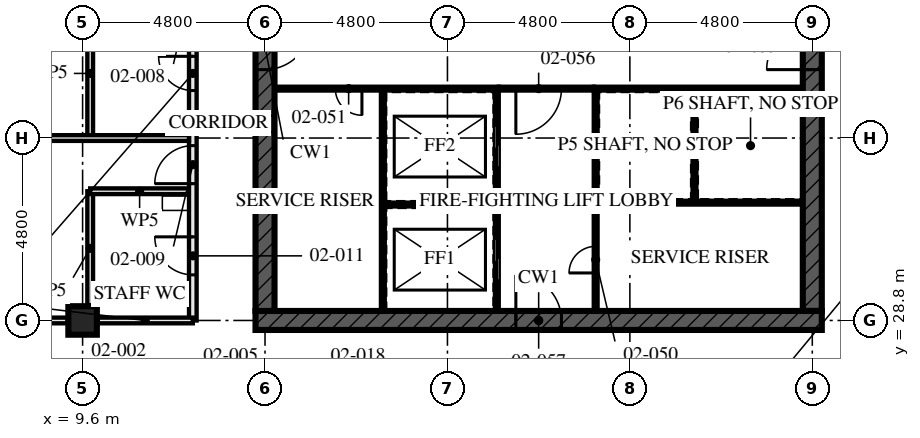
"""IFC4 building model, lengths in metres.
Left out: names, types, materials, properties, quantities, classifications, styles, units other than length and angle.
Written with IfcOpenShell. Run it as: python <this file> out.ifc"""

import sys

from ifc_helpers import new_model, si_unit, direction, frame, frame_2d, origin, origin_2d, place, context, subcontext, project, spatial, rectangle, hollow_rectangle, extrude, element, fill, save


model = new_model("IFC4")
c1 = context("Model", 3, precision=1e-05, world=origin(), true_north=direction((0.0, 1.0)))
c2 = subcontext(c1, "Body", "Model", "MODEL_VIEW")
j1 = project(units=[si_unit("LENGTHUNIT", "METRE"), si_unit("PLANEANGLEUNIT", "RADIAN")], contexts=[c1])
p1 = place(None, origin())
s1 = spatial("IfcSite", under=j1, at=p1, CompositionType="ELEMENT")
p2 = place(p1, origin())
s2 = spatial("IfcBuilding", under=s1, at=p2, CompositionType="ELEMENT")
p3 = place(p2, frame((0.0, 0.0, 9.0)))
s3 = spatial("IfcBuildingStorey", under=s2, at=p3, CompositionType="ELEMENT", Elevation=9.0)
p4 = place(p3, frame((9.6, 28.8, 0.0), z_axis=(0.0, 0.0, 1.0), x_axis=(0.0, 1.0, 0.0)))
e1 = element("IfcColumn", 1, at=p4, inside=s3, PredefinedType="COLUMN", context=c2, shape_type="SweptSolid", body=[
    extrude(hollow_rectangle(XDim=0.75, YDim=0.75, WallThickness=0.08, at=origin_2d()), origin(), (0.0, 0.0, 1.0), 4.5),
])
p5 = place(p3, frame((14.15, 28.8, -0.17), z_axis=(0.0, 0.0, 1.0), x_axis=(1.0, 0.0, 0.0)))
e2 = element("IfcWall", 2, at=p5, inside=s3, PredefinedType="SHEAR", context=c2, shape_type="SweptSolid", body=[
    extrude(rectangle(XDim=14.9, YDim=0.5, at=frame_2d((7.45, 0.0))), origin(), (0.0, 0.0, 1.0), 4.5),
])
p6 = place(p5, frame((6.85, 0.0, 0.17)))
e3 = element("IfcOpeningElement", 3, at=p6, cuts=e2, PredefinedType="OPENING", context=c2, shape_type="SweptSolid", body=[
    extrude(rectangle(XDim=1.2, YDim=2.1, at=frame_2d((0.6, 1.05))), frame((0.0, 0.26, 0.0), z_axis=(0.0, -1.0, 0.0), x_axis=(1.0, 0.0, 0.0)), (0.0, 0.0, 1.0), 0.521),
])
p7 = place(p3, frame((14.4, 42.95, -0.17), z_axis=(0.0, 0.0, 1.0), x_axis=(0.0, -1.0, 0.0)))
e4 = element("IfcWall", 4, at=p7, inside=s3, PredefinedType="SHEAR", context=c2, shape_type="SweptSolid", body=[
    extrude(rectangle(XDim=13.9, YDim=0.5, at=frame_2d((6.95, 0.0))), origin(), (0.0, 0.0, 1.0), 4.5),
])
p8 = place(p7, frame((6.35, 0.0, 0.17)))
e5 = element("IfcOpeningElement", 5, at=p8, cuts=e4, PredefinedType="OPENING", context=c2, shape_type="SweptSolid", body=[
    extrude(rectangle(XDim=1.2, YDim=2.1, at=frame_2d((0.6, 1.05))), frame((0.0, 0.26, 0.0), z_axis=(0.0, -1.0, 0.0), x_axis=(1.0, 0.0, 0.0)), (0.0, 0.0, 1.0), 0.521),
])
p9 = place(p3, frame((28.8, 29.05, -0.17), z_axis=(0.0, 0.0, 1.0), x_axis=(0.0, 1.0, 0.0)))
e6 = element("IfcWall", 6, at=p9, inside=s3, PredefinedType="SHEAR", context=c2, shape_type="SweptSolid", body=[
    extrude(rectangle(XDim=13.9, YDim=0.5, at=frame_2d((6.95, 0.0))), origin(), (0.0, 0.0, 1.0), 4.5),
])
p10 = place(p9, frame((6.35, 0.0, 0.17)))
e7 = element("IfcOpeningElement", 7, at=p10, cuts=e6, PredefinedType="OPENING", context=c2, shape_type="SweptSolid", body=[
    extrude(rectangle(XDim=1.2, YDim=2.1, at=frame_2d((0.6, 1.05))), frame((0.0, 0.26, 0.0), z_axis=(0.0, -1.0, 0.0), x_axis=(1.0, 0.0, 0.0)), (0.0, 0.0, 1.0), 0.521),
])
p11 = place(p3, frame((9.8, 37.0, 0.0), z_axis=(0.0, 0.0, 1.0), x_axis=(0.0, -1.0, 0.0)))
e8 = element("IfcWall", 8, at=p11, inside=s3, PredefinedType="PARTITIONING", context=c2, shape_type="SweptSolid", body=[
    extrude(rectangle(XDim=3.4, YDim=0.15, at=frame_2d((1.7, 0.0))), origin(), (0.0, 0.0, 1.0), 4.33),
])
p12 = place(p3, frame((9.8, 32.2, 0.0), z_axis=(0.0, 0.0, 1.0), x_axis=(1.0, 0.0, 0.0)))
e9 = element("IfcWall", 9, at=p12, inside=s3, PredefinedType="PARTITIONING", context=c2, shape_type="SweptSolid", body=[
    extrude(rectangle(XDim=2.6, YDim=0.15, at=frame_2d((1.3, 0.0))), origin(), (0.0, 0.0, 1.0), 4.33),
])
p13 = place(p3, frame((9.8, 32.2, 0.0), z_axis=(0.0, 0.0, 1.0), x_axis=(0.0, -1.0, 0.0)))
e10 = element("IfcWall", 10, at=p13, inside=s3, PredefinedType="PARTITIONING", context=c2, shape_type="SweptSolid", body=[
    extrude(rectangle(XDim=3.005, YDim=0.15, at=frame_2d((1.502, 0.0))), origin(), (0.0, 0.0, 1.0), 4.33),
])
p14 = place(p3, frame((0.395, 33.6, 0.0), z_axis=(0.0, 0.0, 1.0), x_axis=(1.0, 0.0, 0.0)))
e11 = element("IfcWall", 11, at=p14, inside=s3, PredefinedType="PARTITIONING", context=c2, shape_type="SweptSolid", body=[
    extrude(rectangle(XDim=12.005, YDim=0.15, at=frame_2d((6.002, 0.0))), origin(), (0.0, 0.0, 1.0), 3.55),
])
p15 = place(p3, frame((12.5, 43.2, 0.0), z_axis=(0.0, 0.0, 1.0), x_axis=(0.0, -1.0, 0.0)))
e12 = element("IfcWall", 12, at=p15, inside=s3, PredefinedType="PARTITIONING", context=c2, shape_type="SweptSolid", body=[
    extrude(rectangle(XDim=14.4, YDim=0.2, at=frame_2d((7.2, 0.0))), origin(), (0.0, 0.0, 1.0), 3.55),
])
p16 = place(p15, frame((1.4, 0.0, 0.0)))
e13 = element("IfcOpeningElement", 13, at=p16, cuts=e12, PredefinedType="OPENING", context=c2, shape_type="SweptSolid", body=[
    extrude(rectangle(XDim=1.0, YDim=2.1, at=frame_2d((0.5, 1.05))), frame((0.0, 0.111, 0.0), z_axis=(0.0, -1.0, 0.0), x_axis=(1.0, 0.0, 0.0)), (0.0, 0.0, 1.0), 0.221),
])
p17 = place(p15, frame((3.6, 0.0, 0.0)))
e14 = element("IfcOpeningElement", 14, at=p17, cuts=e12, PredefinedType="OPENING", context=c2, shape_type="SweptSolid", body=[
    extrude(rectangle(XDim=1.0, YDim=2.4, at=frame_2d((0.5, 1.2))), frame((0.0, 0.111, 0.0), z_axis=(0.0, -1.0, 0.0), x_axis=(1.0, 0.0, 0.0)), (0.0, 0.0, 1.0), 0.221),
])
p18 = place(p15, frame((5.0, 0.0, 0.0)))
e15 = element("IfcOpeningElement", 15, at=p18, cuts=e12, PredefinedType="OPENING", context=c2, shape_type="SweptSolid", body=[
    extrude(rectangle(XDim=1.0, YDim=2.4, at=frame_2d((0.5, 1.2))), frame((0.0, 0.111, 0.0), z_axis=(0.0, -1.0, 0.0), x_axis=(1.0, 0.0, 0.0)), (0.0, 0.0, 1.0), 0.221),
])
p19 = place(p15, frame((9.8, 0.0, 0.0)))
e16 = element("IfcOpeningElement", 16, at=p19, cuts=e12, PredefinedType="OPENING", context=c2, shape_type="SweptSolid", body=[
    extrude(rectangle(XDim=1.0, YDim=2.4, at=frame_2d((0.5, 1.2))), frame((0.0, 0.111, 0.0), z_axis=(0.0, -1.0, 0.0), x_axis=(1.0, 0.0, 0.0)), (0.0, 0.0, 1.0), 0.221),
])
p20 = place(p15, frame((7.45, 0.0, 0.0)))
e17 = element("IfcOpeningElement", 17, at=p20, cuts=e12, PredefinedType="OPENING", context=c2, shape_type="SweptSolid", body=[
    extrude(rectangle(XDim=0.9, YDim=2.1, at=frame_2d((0.45, 1.05))), frame((0.0, 0.111, 0.0), z_axis=(0.0, -1.0, 0.0), x_axis=(1.0, 0.0, 0.0)), (0.0, 0.0, 1.0), 0.221),
])
p21 = place(p15, frame((12.2, 0.0, 0.0)))
e18 = element("IfcOpeningElement", 18, at=p21, cuts=e12, PredefinedType="OPENING", context=c2, shape_type="SweptSolid", body=[
    extrude(rectangle(XDim=1.0, YDim=2.1, at=frame_2d((0.5, 1.05))), frame((0.0, 0.111, 0.0), z_axis=(0.0, -1.0, 0.0), x_axis=(1.0, 0.0, 0.0)), (0.0, 0.0, 1.0), 0.221),
])
p22 = place(p3, frame((20.5, 29.05, 0.0), z_axis=(0.0, 0.0, 1.0), x_axis=(0.0, 1.0, 0.0)))
e19 = element("IfcWall", 19, at=p22, inside=s3, PredefinedType="SOLIDWALL", context=c2, shape_type="SweptSolid", body=[
    extrude(rectangle(XDim=5.8, YDim=0.1, at=frame_2d((2.9, 0.0))), origin(), (0.0, 0.0, 1.0), 4.33),
])
p23 = place(p22, frame((0.8, 0.0, 0.0)))
e20 = element("IfcOpeningElement", 20, at=p23, cuts=e19, PredefinedType="OPENING", context=c2, shape_type="SweptSolid", body=[
    extrude(rectangle(XDim=1.1, YDim=2.3, at=frame_2d((0.55, 1.15))), frame((0.0, 0.061, 0.0), z_axis=(0.0, -1.0, 0.0), x_axis=(1.0, 0.0, 0.0)), (0.0, 0.0, 1.0), 0.121),
])
p24 = place(p22, frame((3.775, 0.0, 0.0)))
e21 = element("IfcOpeningElement", 21, at=p24, cuts=e19, PredefinedType="OPENING", context=c2, shape_type="SweptSolid", body=[
    extrude(rectangle(XDim=1.1, YDim=2.3, at=frame_2d((0.55, 1.15))), frame((0.0, 0.061, 0.0), z_axis=(0.0, -1.0, 0.0), x_axis=(1.0, 0.0, 0.0)), (0.0, 0.0, 1.0), 0.121),
])
p25 = place(p3, frame((23.1, 29.05, 0.0), z_axis=(0.0, 0.0, 1.0), x_axis=(0.0, 1.0, 0.0)))
e22 = element("IfcWall", 22, at=p25, inside=s3, PredefinedType="SOLIDWALL", context=c2, shape_type="SweptSolid", body=[
    extrude(rectangle(XDim=5.8, YDim=0.1, at=frame_2d((2.9, 0.0))), origin(), (0.0, 0.0, 1.0), 4.33),
])
p26 = place(p25, frame((1.0, 0.0, 0.0)))
e23 = element("IfcOpeningElement", 23, at=p26, cuts=e22, PredefinedType="OPENING", context=c2, shape_type="SweptSolid", body=[
    extrude(rectangle(XDim=0.7, YDim=2.1, at=frame_2d((0.35, 1.05))), frame((0.0, 0.061, 0.0), z_axis=(0.0, -1.0, 0.0), x_axis=(1.0, 0.0, 0.0)), (0.0, 0.0, 1.0), 0.121),
])
p27 = place(p3, frame((14.65, 34.9, 0.0), z_axis=(0.0, 0.0, 1.0), x_axis=(1.0, 0.0, 0.0)))
e24 = element("IfcWall", 24, at=p27, inside=s3, PredefinedType="SOLIDWALL", context=c2, shape_type="SweptSolid", body=[
    extrude(rectangle(XDim=5.9, YDim=0.1, at=frame_2d((2.95, 0.0))), origin(), (0.0, 0.0, 1.0), 4.33),
])
p28 = place(p27, frame((1.6, 0.0, 0.0)))
e25 = element("IfcOpeningElement", 25, at=p28, cuts=e24, PredefinedType="OPENING", context=c2, shape_type="SweptSolid", body=[
    extrude(rectangle(XDim=0.7, YDim=2.1, at=frame_2d((0.35, 1.05))), frame((0.0, 0.061, 0.0), z_axis=(0.0, -1.0, 0.0), x_axis=(1.0, 0.0, 0.0)), (0.0, 0.0, 1.0), 0.121),
])
p29 = place(p3, frame((23.05, 34.9, 0.0), z_axis=(0.0, 0.0, 1.0), x_axis=(1.0, 0.0, 0.0)))
e26 = element("IfcWall", 26, at=p29, inside=s3, PredefinedType="SOLIDWALL", context=c2, shape_type="SweptSolid", body=[
    extrude(rectangle(XDim=5.5, YDim=0.1, at=frame_2d((2.75, 0.0))), origin(), (0.0, 0.0, 1.0), 4.33),
])
p30 = place(p3, frame((20.55, 34.9, 0.0), z_axis=(0.0, 0.0, 1.0), x_axis=(1.0, 0.0, 0.0)))
e27 = element("IfcWall", 27, at=p30, inside=s3, PredefinedType="SOLIDWALL", context=c2, shape_type="SweptSolid", body=[
    extrude(rectangle(XDim=2.5, YDim=0.1, at=frame_2d((1.25, 0.0))), origin(), (0.0, 0.0, 1.0), 4.33),
])
p31 = place(p30, frame((0.45, 0.0, 0.0)))
e28 = element("IfcOpeningElement", 28, at=p31, cuts=e27, PredefinedType="OPENING", context=c2, shape_type="SweptSolid", body=[
    extrude(rectangle(XDim=1.2, YDim=2.1, at=frame_2d((0.6, 1.05))), frame((0.0, 0.061, 0.0), z_axis=(0.0, -1.0, 0.0), x_axis=(1.0, 0.0, 0.0)), (0.0, 0.0, 1.0), 0.121),
])
p32 = place(p3, frame((17.5, 29.05, 0.0), z_axis=(0.0, 0.0, 1.0), x_axis=(0.0, 1.0, 0.0)))
e29 = element("IfcWall", 29, at=p32, inside=s3, PredefinedType="SOLIDWALL", context=c2, shape_type="SweptSolid", body=[
    extrude(rectangle(XDim=5.8, YDim=0.1, at=frame_2d((2.9, 0.0))), origin(), (0.0, 0.0, 1.0), 4.33),
])
p33 = place(p3, frame((17.55, 31.85, 0.0), z_axis=(0.0, 0.0, 1.0), x_axis=(1.0, 0.0, 0.0)))
e30 = element("IfcWall", 30, at=p33, inside=s3, PredefinedType="SOLIDWALL", context=c2, shape_type="SweptSolid", body=[
    extrude(rectangle(XDim=2.9, YDim=0.1, at=frame_2d((1.45, 0.0))), origin(), (0.0, 0.0, 1.0), 4.33),
])
p34 = place(p3, frame((25.7, 31.95, 0.0), z_axis=(0.0, 0.0, 1.0), x_axis=(0.0, 1.0, 0.0)))
e31 = element("IfcWall", 31, at=p34, inside=s3, PredefinedType="SOLIDWALL", context=c2, shape_type="SweptSolid", body=[
    extrude(rectangle(XDim=2.9, YDim=0.1, at=frame_2d((1.45, 0.0))), origin(), (0.0, 0.0, 1.0), 4.33),
])
p35 = place(p3, frame((23.15, 31.9, 0.0), z_axis=(0.0, 0.0, 1.0), x_axis=(1.0, 0.0, 0.0)))
e32 = element("IfcWall", 32, at=p35, inside=s3, PredefinedType="SOLIDWALL", context=c2, shape_type="SweptSolid", body=[
    extrude(rectangle(XDim=5.4, YDim=0.1, at=frame_2d((2.7, 0.0))), origin(), (0.0, 0.0, 1.0), 4.33),
])
p36 = place(p3, frame((12.5, 28.8, 0.0), z_axis=(0.0, 0.0, 1.0), x_axis=(-1.0, 0.0, 0.0)))
e33 = element("IfcWall", 33, at=p36, inside=s3, PredefinedType="PARTITIONING", context=c2, shape_type="SweptSolid", body=[
    extrude(rectangle(XDim=2.505, YDim=0.15, at=frame_2d((1.252, 0.0))), origin(), (0.0, 0.0, 1.0), 3.32),
])
p37 = place(p3, frame((9.205, 28.8, 0.0), z_axis=(0.0, 0.0, 1.0), x_axis=(-1.0, 0.0, 0.0)))
e34 = element("IfcWall", 34, at=p37, inside=s3, PredefinedType="PARTITIONING", context=c2, shape_type="SweptSolid", body=[
    extrude(rectangle(XDim=4.01, YDim=0.15, at=frame_2d((2.005, 0.0))), origin(), (0.0, 0.0, 1.0), 3.32),
])
p38 = place(p19, frame((1.0, 0.0, 0.0), z_axis=(0.0, 0.0, 1.0), x_axis=(-1.0, 0.0, 0.0)))
e35 = element("IfcDoor", 35, at=p38, inside=s3, OperationType="SINGLE_SWING_RIGHT", PredefinedType="DOOR", context=c2, shape_type="SweptSolid", body=[
    extrude(rectangle(XDim=1.0, YDim=2.4, at=frame_2d((0.5, 1.2))), frame((0.0, 0.027, 0.0), z_axis=(0.0, -1.0, 0.0), x_axis=(1.0, 0.0, 0.0)), (0.0, 0.0, 1.0), 0.054),
])
fill(e16, e35)
p39 = place(p20, frame((0.9, 0.0, 0.0), z_axis=(0.0, 0.0, 1.0), x_axis=(-1.0, 0.0, 0.0)))
e36 = element("IfcDoor", 36, at=p39, inside=s3, OperationType="SINGLE_SWING_LEFT", PredefinedType="DOOR", context=c2, shape_type="SweptSolid", body=[
    extrude(rectangle(XDim=0.9, YDim=2.1, at=frame_2d((0.45, 1.05))), frame((0.0, 0.027, 0.0), z_axis=(0.0, -1.0, 0.0), x_axis=(1.0, 0.0, 0.0)), (0.0, 0.0, 1.0), 0.054),
])
fill(e17, e36)
p40 = place(p21, frame((1.0, 0.0, 0.0), z_axis=(0.0, 0.0, 1.0), x_axis=(-1.0, 0.0, 0.0)))
e37 = element("IfcDoor", 37, at=p40, inside=s3, OperationType="SINGLE_SWING_LEFT", PredefinedType="DOOR", context=c2, shape_type="SweptSolid", body=[
    extrude(rectangle(XDim=1.0, YDim=2.1, at=frame_2d((0.5, 1.05))), frame((0.0, 0.027, 0.0), z_axis=(0.0, -1.0, 0.0), x_axis=(1.0, 0.0, 0.0)), (0.0, 0.0, 1.0), 0.054),
])
fill(e18, e37)
p41 = place(p23, origin())
e38 = element("IfcDoor", 38, at=p41, inside=s3, OperationType="SLIDING_TO_LEFT", PredefinedType="DOOR", context=c2, shape_type="SweptSolid", body=[
    extrude(rectangle(XDim=1.1, YDim=2.3, at=frame_2d((0.55, 1.15))), frame((0.0, 0.05, 0.0), z_axis=(0.0, -1.0, 0.0), x_axis=(1.0, 0.0, 0.0)), (0.0, 0.0, 1.0), 0.1),
])
fill(e20, e38)
p42 = place(p24, origin())
e39 = element("IfcDoor", 39, at=p42, inside=s3, OperationType="SLIDING_TO_LEFT", PredefinedType="DOOR", context=c2, shape_type="SweptSolid", body=[
    extrude(rectangle(XDim=1.1, YDim=2.3, at=frame_2d((0.55, 1.15))), frame((0.0, 0.05, 0.0), z_axis=(0.0, -1.0, 0.0), x_axis=(1.0, 0.0, 0.0)), (0.0, 0.0, 1.0), 0.1),
])
fill(e21, e39)
p43 = place(p26, origin())
e40 = element("IfcDoor", 40, at=p43, inside=s3, OperationType="SINGLE_SWING_RIGHT", PredefinedType="DOOR", context=c2, shape_type="SweptSolid", body=[
    extrude(rectangle(XDim=0.7, YDim=2.1, at=frame_2d((0.35, 1.05))), frame((0.0, 0.027, 0.0), z_axis=(0.0, -1.0, 0.0), x_axis=(1.0, 0.0, 0.0)), (0.0, 0.0, 1.0), 0.054),
])
fill(e23, e40)
p44 = place(p28, frame((0.7, 0.0, 0.0), z_axis=(0.0, 0.0, 1.0), x_axis=(-1.0, 0.0, 0.0)))
e41 = element("IfcDoor", 41, at=p44, inside=s3, OperationType="SINGLE_SWING_RIGHT", PredefinedType="DOOR", context=c2, shape_type="SweptSolid", body=[
    extrude(rectangle(XDim=0.7, YDim=2.1, at=frame_2d((0.35, 1.05))), frame((0.0, 0.027, 0.0), z_axis=(0.0, -1.0, 0.0), x_axis=(1.0, 0.0, 0.0)), (0.0, 0.0, 1.0), 0.054),
])
fill(e25, e41)
p45 = place(p31, frame((1.2, 0.0, 0.0), z_axis=(0.0, 0.0, 1.0), x_axis=(-1.0, 0.0, 0.0)))
e42 = element("IfcDoor", 42, at=p45, inside=s3, OperationType="SINGLE_SWING_LEFT", PredefinedType="DOOR", context=c2, shape_type="SweptSolid", body=[
    extrude(rectangle(XDim=1.2, YDim=2.1, at=frame_2d((0.6, 1.05))), frame((0.0, 0.027, 0.0), z_axis=(0.0, -1.0, 0.0), x_axis=(1.0, 0.0, 0.0)), (0.0, 0.0, 1.0), 0.054),
])
fill(e28, e42)
p46 = place(p6, origin())
e43 = element("IfcDoor", 43, at=p46, inside=s3, OperationType="SINGLE_SWING_LEFT", PredefinedType="DOOR", context=c2, shape_type="SweptSolid", body=[
    extrude(rectangle(XDim=1.2, YDim=2.1, at=frame_2d((0.6, 1.05))), frame((0.0, 0.027, 0.0), z_axis=(0.0, -1.0, 0.0), x_axis=(1.0, 0.0, 0.0)), (0.0, 0.0, 1.0), 0.054),
])
fill(e3, e43)
p47 = place(p8, origin())
e44 = element("IfcDoor", 44, at=p47, inside=s3, OperationType="SINGLE_SWING_LEFT", PredefinedType="DOOR", context=c2, shape_type="SweptSolid", body=[
    extrude(rectangle(XDim=1.2, YDim=2.1, at=frame_2d((0.6, 1.05))), frame((0.0, 0.027, 0.0), z_axis=(0.0, -1.0, 0.0), x_axis=(1.0, 0.0, 0.0)), (0.0, 0.0, 1.0), 0.054),
])
fill(e5, e44)
p48 = place(p10, origin())
e45 = element("IfcDoor", 45, at=p48, inside=s3, OperationType="SINGLE_SWING_LEFT", PredefinedType="DOOR", context=c2, shape_type="SweptSolid", body=[
    extrude(rectangle(XDim=1.2, YDim=2.1, at=frame_2d((0.6, 1.05))), frame((0.0, 0.027, 0.0), z_axis=(0.0, -1.0, 0.0), x_axis=(1.0, 0.0, 0.0)), (0.0, 0.0, 1.0), 0.054),
])
fill(e7, e45)
save(model, sys.argv[1])
